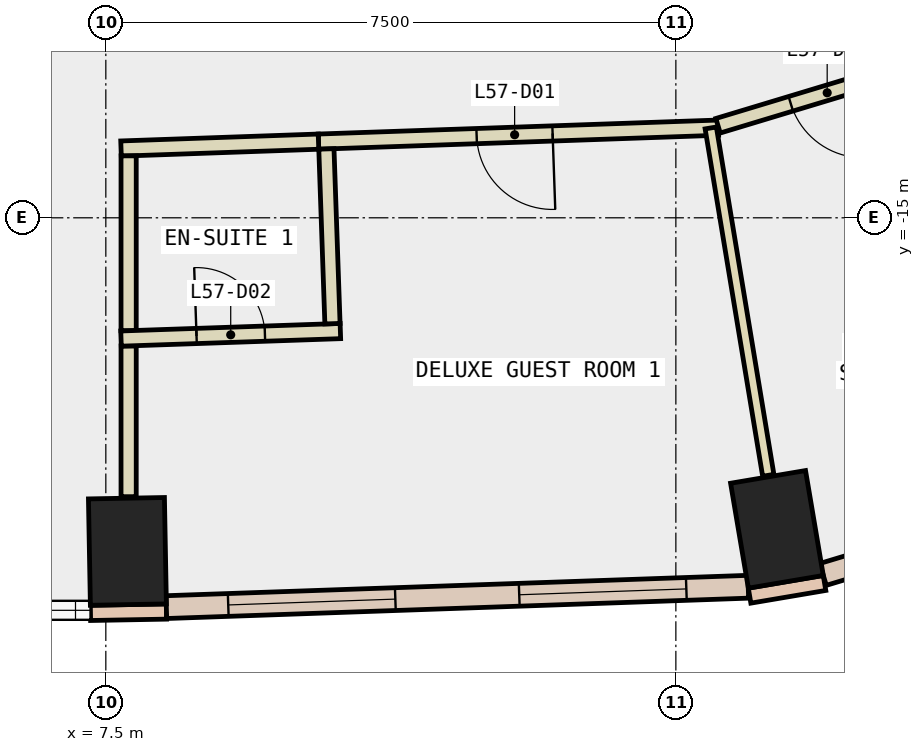
"""IFC4 building model, lengths in metres.
Left out: names, types, materials, properties, quantities, classifications, styles, units other than length and angle.
Written with IfcOpenShell. Run it as: python <this file> out.ifc"""

import sys

from ifc_helpers import new_model, si_unit, direction, frame, frame_2d, origin, origin_2d, place, context, subcontext, project, spatial, rectangle, extrude, element, fill, save


model = new_model("IFC4")
c1 = context("Model", 3, precision=1e-05, world=origin(), true_north=direction((0.0, 1.0)))
c2 = subcontext(c1, "Body", "Model", "MODEL_VIEW")
j1 = project(units=[si_unit("LENGTHUNIT", "METRE"), si_unit("PLANEANGLEUNIT", "RADIAN")], contexts=[c1])
p1 = place(None, origin())
s1 = spatial("IfcSite", under=j1, at=p1, CompositionType="ELEMENT")
p2 = place(p1, origin())
s2 = spatial("IfcBuilding", under=s1, at=p2, CompositionType="ELEMENT")
p3 = place(p2, frame((0.0, 0.0, 252.2)))
s3 = spatial("IfcBuildingStorey", under=s2, at=p3, CompositionType="ELEMENT", Elevation=252.2)
for number, where, z_axis, x_axis in (
    (1, (7.784, -19.389, -0.34), (0.0, 0.0, 1.0), (1.0, 0.018, 0.0)),
    (2, (16.33, -19.099, -0.34), (0.0, 0.0, 1.0), (0.986, 0.167, 0.0)),
):
    element("IfcColumn", number, at=place(p3, frame(where, z_axis=z_axis, x_axis=x_axis)), inside=s3, PredefinedType="COLUMN", context=c2, shape_type="SweptSolid", body=[
        extrude(rectangle(XDim=1.0, YDim=1.4, at=origin_2d()), origin(), (0.0, 0.0, 1.0), 3.6),
    ])
for number, where, z_axis, x_axis in (
    (3, (7.298, -20.198, 0.0), (0.0, 0.0, 1.0), (1.0, 0.018, 0.0)),
    (4, (15.97, -19.971, 0.0), (0.0, 0.0, 1.0), (0.986, 0.167, 0.0)),
):
    element("IfcWall", number, at=place(p3, frame(where, z_axis=z_axis, x_axis=x_axis)), inside=s3, PredefinedType="STANDARD", context=c2, shape_type="SweptSolid", body=[
        extrude(rectangle(XDim=1.0, YDim=0.2, at=frame_2d((0.5, 0.0))), origin(), (0.0, 0.0, 1.0), 3.26),
    ])
p4 = place(p3, frame((8.296, -20.122, 0.0), z_axis=(0.0, 0.0, 1.0), x_axis=(0.999387577449, 0.034992428331, 0.0)))
e5 = element("IfcWall", 5, at=p4, inside=s3, PredefinedType="STANDARD", context=c2, shape_type="SweptSolid", body=[
    extrude(rectangle(XDim=7.661, YDim=0.3, at=frame_2d((3.83, 0.0))), origin(), (0.0, 0.0, 1.0), 3.26),
])
p5 = place(p4, frame((0.815, 0.0, 0.9)))
e6 = element("IfcOpeningElement", 6, at=p5, cuts=e5, PredefinedType="OPENING", context=c2, shape_type="SweptSolid", body=[
    extrude(rectangle(XDim=2.2, YDim=2.0, at=frame_2d((1.1, 1.0))), frame((0.0, 0.16, 0.0), z_axis=(0.0, -1.0, 0.0), x_axis=(1.0, 0.0, 0.0)), (0.0, 0.0, 1.0), 0.32),
])
p6 = place(p4, frame((4.646, 0.0, 0.9)))
e7 = element("IfcOpeningElement", 7, at=p6, cuts=e5, PredefinedType="OPENING", context=c2, shape_type="SweptSolid", body=[
    extrude(rectangle(XDim=2.2, YDim=2.0, at=frame_2d((1.1, 1.0))), frame((0.0, 0.16, 0.0), z_axis=(0.0, -1.0, 0.0), x_axis=(1.0, 0.0, 0.0)), (0.0, 0.0, 1.0), 0.32),
])
p7 = place(p3, frame((16.936, -19.692, 0.0), z_axis=(0.0, 0.0, 1.0), x_axis=(0.957346168713, 0.288943442997, 0.0)))
e8 = element("IfcWall", 8, at=p7, inside=s3, PredefinedType="STANDARD", context=c2, shape_type="SweptSolid", body=[
    extrude(rectangle(XDim=4.281, YDim=0.3, at=frame_2d((2.14, 0.0))), origin(), (0.0, 0.0, 1.0), 3.26),
])
p8 = place(p7, frame((1.44, 0.0, 0.9)))
e9 = element("IfcOpeningElement", 9, at=p8, cuts=e8, PredefinedType="OPENING", context=c2, shape_type="SweptSolid", body=[
    extrude(rectangle(XDim=1.4, YDim=2.0, at=frame_2d((0.7, 1.0))), frame((0.0, 0.16, 0.0), z_axis=(0.0, -1.0, 0.0), x_axis=(1.0, 0.0, 0.0)), (0.0, 0.0, 1.0), 0.32),
])
p9 = place(p3, frame((15.559, -13.814, 0.0), z_axis=(0.0, 0.0, 1.0), x_axis=(-0.999388410674, -0.034968623214, 0.0)))
e10 = element("IfcWall", 10, at=p9, inside=s3, PredefinedType="PARTITIONING", context=c2, shape_type="SweptSolid", body=[
    extrude(rectangle(XDim=5.264, YDim=0.2, at=frame_2d((2.632, 0.0))), origin(), (0.0, 0.0, 1.0), 3.26),
])
p10 = place(p9, frame((2.182, 0.0, 0.0)))
e11 = element("IfcOpeningElement", 11, at=p10, cuts=e10, PredefinedType="OPENING", context=c2, shape_type="SweptSolid", body=[
    extrude(rectangle(XDim=1.0, YDim=2.1, at=frame_2d((0.5, 1.05))), frame((0.0, 0.11, 0.0), z_axis=(0.0, -1.0, 0.0), x_axis=(1.0, 0.0, 0.0)), (0.0, 0.0, 1.0), 0.22),
])
p11 = place(p3, frame((10.298, -13.998, 0.0), z_axis=(0.0, 0.0, 1.0), x_axis=(-0.999386321032, -0.035028293342, 0.0)))
e12 = element("IfcWall", 12, at=p11, inside=s3, PredefinedType="PARTITIONING", context=c2, shape_type="SweptSolid", body=[
    extrude(rectangle(XDim=2.6, YDim=0.2, at=frame_2d((1.3, 0.0))), origin(), (0.0, 0.0, 1.0), 3.26),
])
p12 = place(p3, frame((18.427, -12.922, 0.0), z_axis=(0.0, 0.0, 1.0), x_axis=(-0.957336631432, -0.288975040651, 0.0)))
e13 = element("IfcWall", 13, at=p12, inside=s3, PredefinedType="PARTITIONING", context=c2, shape_type="SweptSolid", body=[
    extrude(rectangle(XDim=3.0, YDim=0.2, at=frame_2d((1.5, 0.0))), origin(), (0.0, 0.0, 1.0), 3.26),
])
p13 = place(p12, frame((1.0, 0.0, 0.0)))
e14 = element("IfcOpeningElement", 14, at=p13, cuts=e13, PredefinedType="OPENING", context=c2, shape_type="SweptSolid", body=[
    extrude(rectangle(XDim=1.0, YDim=2.1, at=frame_2d((0.5, 1.05))), frame((0.0, 0.11, 0.0), z_axis=(0.0, -1.0, 0.0), x_axis=(1.0, 0.0, 0.0)), (0.0, 0.0, 1.0), 0.22),
])
p14 = place(p3, frame((7.8, -16.686, 0.0), z_axis=(0.0, 0.0, 1.0), x_axis=(0.0, -1.0, 0.0)))
e15 = element("IfcWall", 15, at=p14, inside=s3, PredefinedType="PARTITIONING", context=c2, shape_type="SweptSolid", body=[
    extrude(rectangle(XDim=1.983, YDim=0.2, at=frame_2d((0.991, 0.0))), origin(), (0.0, 0.0, 1.0), 3.26),
])
p15 = place(p3, frame((7.8, -14.185, 0.0), z_axis=(0.0, 0.0, 1.0), x_axis=(0.0, -1.0, 0.0)))
e16 = element("IfcWall", 16, at=p15, inside=s3, PredefinedType="PARTITIONING", context=c2, shape_type="SweptSolid", body=[
    extrude(rectangle(XDim=2.301, YDim=0.2, at=frame_2d((1.15, 0.0))), origin(), (0.0, 0.0, 1.0), 3.26),
])
p16 = place(p3, frame((7.7, -16.589, 0.0), z_axis=(0.0, 0.0, 1.0), x_axis=(0.999410709261, 0.034325416459, 0.0)))
e17 = element("IfcWall", 17, at=p16, inside=s3, PredefinedType="PARTITIONING", context=c2, shape_type="SweptSolid", body=[
    extrude(rectangle(XDim=2.888, YDim=0.2, at=frame_2d((1.444, 0.0))), origin(), (0.0, 0.0, 1.0), 3.26),
])
p17 = place(p16, frame((0.994, 0.0, 0.0)))
e18 = element("IfcOpeningElement", 18, at=p17, cuts=e17, PredefinedType="OPENING", context=c2, shape_type="SweptSolid", body=[
    extrude(rectangle(XDim=0.9, YDim=2.1, at=frame_2d((0.45, 1.05))), frame((0.0, 0.11, 0.0), z_axis=(0.0, -1.0, 0.0), x_axis=(1.0, 0.0, 0.0)), (0.0, 0.0, 1.0), 0.22),
])
p18 = place(p3, frame((10.482, -16.393, 0.0), z_axis=(0.0, 0.0, 1.0), x_axis=(-0.034703518322, 0.999397651496, 0.0)))
e19 = element("IfcWall", 19, at=p18, inside=s3, PredefinedType="PARTITIONING", context=c2, shape_type="SweptSolid", body=[
    extrude(rectangle(XDim=2.301, YDim=0.2, at=frame_2d((1.15, 0.0))), origin(), (0.0, 0.0, 1.0), 3.26),
])
p19 = place(p3, frame((15.459, -13.818, 0.0), z_axis=(0.0, 0.0, 1.0), x_axis=(0.163441652939, -0.986553002167, 0.0)))
e20 = element("IfcWall", 20, at=p19, inside=s3, PredefinedType="PARTITIONING", context=c2, shape_type="SweptSolid", body=[
    extrude(rectangle(XDim=4.632, YDim=0.15, at=frame_2d((2.316, 0.0))), origin(), (0.0, 0.0, 1.0), 3.26),
])
p20 = place(p5, origin())
e21 = element("IfcWindow", 21, at=p20, inside=s3, PartitioningType="SINGLE_PANEL", PredefinedType="WINDOW", context=c2, shape_type="SweptSolid", body=[
    extrude(rectangle(XDim=2.2, YDim=2.0, at=frame_2d((1.1, 1.0))), frame((0.0, 0.03, 0.0), z_axis=(0.0, -1.0, 0.0), x_axis=(1.0, 0.0, 0.0)), (0.0, 0.0, 1.0), 0.06),
])
fill(e6, e21)
p21 = place(p6, origin())
e22 = element("IfcWindow", 22, at=p21, inside=s3, PartitioningType="SINGLE_PANEL", PredefinedType="WINDOW", context=c2, shape_type="SweptSolid", body=[
    extrude(rectangle(XDim=2.2, YDim=2.0, at=frame_2d((1.1, 1.0))), frame((0.0, 0.03, 0.0), z_axis=(0.0, -1.0, 0.0), x_axis=(1.0, 0.0, 0.0)), (0.0, 0.0, 1.0), 0.06),
])
fill(e7, e22)
p22 = place(p10, origin())
e23 = element("IfcDoor", 23, at=p22, inside=s3, OperationType="SINGLE_SWING_LEFT", PredefinedType="DOOR", context=c2, shape_type="SweptSolid", body=[
    extrude(rectangle(XDim=1.0, YDim=2.1, at=frame_2d((0.5, 1.05))), frame((0.0, 0.025, 0.0), z_axis=(0.0, -1.0, 0.0), x_axis=(1.0, 0.0, 0.0)), (0.0, 0.0, 1.0), 0.05),
])
fill(e11, e23)
p23 = place(p17, origin())
e24 = element("IfcDoor", 24, at=p23, inside=s3, OperationType="SINGLE_SWING_LEFT", PredefinedType="DOOR", context=c2, shape_type="SweptSolid", body=[
    extrude(rectangle(XDim=0.9, YDim=2.1, at=frame_2d((0.45, 1.05))), frame((0.0, 0.025, 0.0), z_axis=(0.0, -1.0, 0.0), x_axis=(1.0, 0.0, 0.0)), (0.0, 0.0, 1.0), 0.05),
])
fill(e18, e24)
p24 = place(p13, origin())
e25 = element("IfcDoor", 25, at=p24, inside=s3, OperationType="SINGLE_SWING_LEFT", PredefinedType="DOOR", context=c2, shape_type="SweptSolid", body=[
    extrude(rectangle(XDim=1.0, YDim=2.1, at=frame_2d((0.5, 1.05))), frame((0.0, 0.025, 0.0), z_axis=(0.0, -1.0, 0.0), x_axis=(1.0, 0.0, 0.0)), (0.0, 0.0, 1.0), 0.05),
])
fill(e14, e25)
save(model, sys.argv[1])
